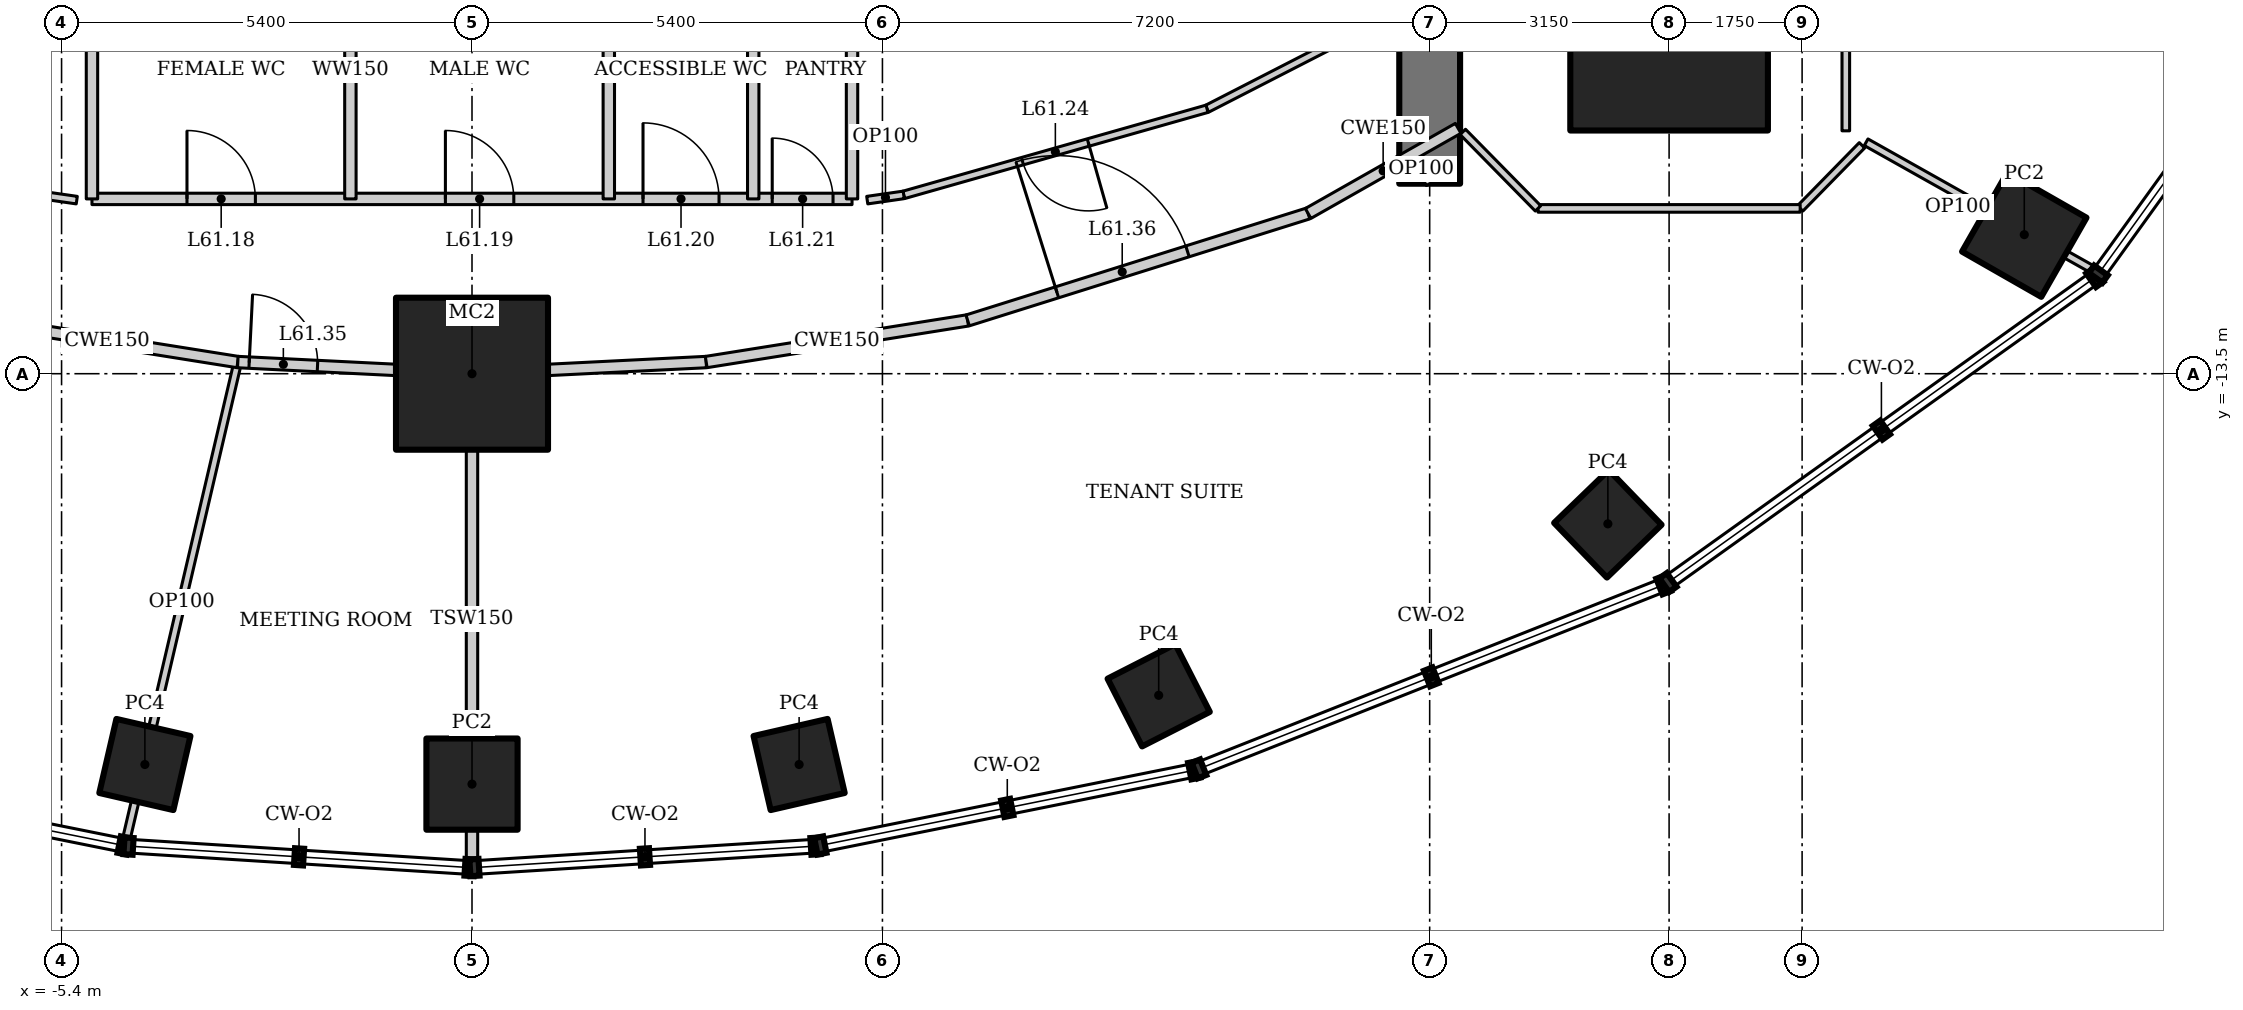
"""IFC4 building model, lengths in metres.
Left out: names, types, materials, properties, quantities, classifications, styles, units other than length and angle.
Written with IfcOpenShell. Run it as: python <this file> out.ifc"""

import sys

from ifc_helpers import new_model, si_unit, direction, frame, frame_2d, origin, origin_2d, place, context, subcontext, project, spatial, rectangle, hollow_rectangle, extrude, element, fill, save


model = new_model("IFC4")
c1 = context("Model", 3, precision=1e-05, world=origin(), true_north=direction((0.0, 1.0)))
c2 = subcontext(c1, "Body", "Model", "MODEL_VIEW")
j1 = project(units=[si_unit("LENGTHUNIT", "METRE"), si_unit("PLANEANGLEUNIT", "RADIAN")], contexts=[c1])
p1 = place(None, origin())
s1 = spatial("IfcSite", under=j1, at=p1, CompositionType="ELEMENT")
p2 = place(p1, origin())
s2 = spatial("IfcBuilding", under=s1, at=p2, CompositionType="ELEMENT")
p3 = place(p2, frame((0.0, 0.0, 262.0)))
s3 = spatial("IfcBuildingStorey", under=s2, at=p3, CompositionType="ELEMENT", Elevation=262.0)
p4 = place(p3, frame((0.0, -13.5, 0.0), z_axis=(0.0, 0.0, 1.0), x_axis=(1.0, 0.0, 0.0)))
e1 = element("IfcColumn", 1, at=p4, inside=s3, PredefinedType="COLUMN", context=c2, shape_type="SweptSolid", body=[
    extrude(hollow_rectangle(XDim=2.0, YDim=2.0, WallThickness=0.17, at=origin_2d()), origin(), (0.0, 0.0, 1.0), 4.2),
])
p5 = place(p3, frame((15.75, -9.0, 0.0), z_axis=(0.0, 0.0, 1.0), x_axis=(1.0, 0.0, 0.0)))
e2 = element("IfcColumn", 2, at=p5, inside=s3, PredefinedType="COLUMN", context=c2, shape_type="SweptSolid", body=[
    extrude(hollow_rectangle(XDim=2.6, YDim=2.6, WallThickness=0.13, at=origin_2d()), origin(), (0.0, 0.0, 1.0), 4.2),
])
p6 = place(p3, frame((-4.304, -18.642, 0.0), z_axis=(0.0, 0.0, 1.0), x_axis=(0.224951054344, 0.974370064785, 0.0)))
e3 = element("IfcColumn", 3, at=p6, inside=s3, PredefinedType="COLUMN", context=c2, shape_type="SweptSolid", body=[
    extrude(hollow_rectangle(XDim=1.0, YDim=1.0, WallThickness=0.08, at=origin_2d()), origin(), (0.0, 0.0, 1.0), 3.1),
])
p7 = place(p3, frame((0.0, -18.9, 0.0), z_axis=(0.0, 0.0, 1.0), x_axis=(1.0, 0.0, 0.0)))
e4 = element("IfcColumn", 4, at=p7, inside=s3, PredefinedType="COLUMN", context=c2, shape_type="SweptSolid", body=[
    extrude(hollow_rectangle(XDim=1.2, YDim=1.2, WallThickness=0.1, at=origin_2d()), origin(), (0.0, 0.0, 1.0), 2.88),
])
for number, where, z_axis, x_axis in (
    (5, (4.304, -18.642, 0.0), (0.0, 0.0, 1.0), (0.974, 0.225, 0.0)),
    (6, (9.035, -17.731, 0.0), (0.0, 0.0, 1.0), (0.891, 0.454, 0.0)),
    (7, (14.944, -15.475, 0.0), (0.0, 0.0, 1.0), (0.719, 0.695, 0.0)),
):
    element("IfcColumn", number, at=place(p3, frame(where, z_axis=z_axis, x_axis=x_axis)), inside=s3, PredefinedType="COLUMN", context=c2, shape_type="SweptSolid", body=[
        extrude(hollow_rectangle(XDim=1.0, YDim=1.0, WallThickness=0.08, at=origin_2d()), origin(), (0.0, 0.0, 1.0), 3.1),
    ])
p8 = place(p3, frame((20.423, -11.67, 0.0), z_axis=(0.0, 0.0, 1.0), x_axis=(0.496139221777, 0.86824298017, 0.0)))
e8 = element("IfcColumn", 8, at=p8, inside=s3, PredefinedType="COLUMN", context=c2, shape_type="SweptSolid", body=[
    extrude(hollow_rectangle(XDim=1.2, YDim=1.2, WallThickness=0.1, at=origin_2d()), origin(), (0.0, 0.0, 1.0), 2.88),
])
p9 = place(p3, frame((12.6, -11.0, 0.0), z_axis=(0.0, 0.0, 1.0), x_axis=(0.0, 1.0, 0.0)))
e9 = element("IfcWall", 9, at=p9, inside=s3, PredefinedType="SHEAR", context=c2, shape_type="SweptSolid", body=[
    extrude(rectangle(XDim=22.0, YDim=0.8, at=frame_2d((11.0, 0.0))), origin(), (0.0, 0.0, 1.0), 4.2),
])
p10 = place(p9, frame((10.1, 0.0, 0.0)))
e10 = element("IfcOpeningElement", 10, at=p10, cuts=e9, PredefinedType="OPENING", context=c2, shape_type="SweptSolid", body=[
    extrude(rectangle(XDim=1.8, YDim=2.1, at=frame_2d((0.9, 1.05))), frame((0.0, 0.41, 0.0), z_axis=(0.0, -1.0, 0.0), x_axis=(1.0, 0.0, 0.0)), (0.0, 0.0, 1.0), 0.82),
])
p11 = place(p3, frame((-4.556, -19.657, 0.0), z_axis=(0.0, 0.0, 1.0), x_axis=(0.227524978141, 0.973772244584, 0.0)))
e11 = element("IfcWall", 11, at=p11, inside=s3, PredefinedType="PARTITIONING", context=c2, shape_type="SweptSolid", body=[
    extrude(rectangle(XDim=6.48, YDim=0.1, at=frame_2d((3.24, 0.0))), origin(), (0.0, 0.0, 1.0), 3.293),
])
p12 = place(p3, frame((0.0, -19.945, 0.0), z_axis=(0.0, 0.0, 1.0), x_axis=(0.0, 1.0, 0.0)))
e12 = element("IfcWall", 12, at=p12, inside=s3, PredefinedType="PARTITIONING", context=c2, shape_type="SweptSolid", body=[
    extrude(rectangle(XDim=6.445, YDim=0.15, at=frame_2d((3.222, 0.0))), origin(), (0.0, 0.0, 1.0), 3.646),
])
p13 = place(p3, frame((-6.521, -12.799, 0.0), z_axis=(0.0, 0.0, 1.0), x_axis=(0.987554093087, -0.157279729233, 0.0)))
e13 = element("IfcWall", 13, at=p13, inside=s3, PredefinedType="PARTITIONING", context=c2, shape_type="SweptSolid", body=[
    extrude(rectangle(XDim=3.483, YDim=0.15, at=frame_2d((1.742, 0.0))), origin(), (0.0, 0.0, 1.0), 4.05),
])
p14 = place(p3, frame((-3.081, -13.347, 0.0), z_axis=(0.0, 0.0, 1.0), x_axis=(0.99876434787, -0.049696855278, 0.0)))
e14 = element("IfcWall", 14, at=p14, inside=s3, PredefinedType="PARTITIONING", context=c2, shape_type="SweptSolid", body=[
    extrude(rectangle(XDim=3.085, YDim=0.15, at=frame_2d((1.542, 0.0))), origin(), (0.0, 0.0, 1.0), 4.05),
])
p15 = place(p14, frame((0.15, 0.0, 0.0)))
e15 = element("IfcOpeningElement", 15, at=p15, cuts=e14, PredefinedType="OPENING", context=c2, shape_type="SweptSolid", body=[
    extrude(rectangle(XDim=0.9, YDim=2.1, at=frame_2d((0.45, 1.05))), frame((0.0, 0.085, 0.0), z_axis=(0.0, -1.0, 0.0), x_axis=(1.0, 0.0, 0.0)), (0.0, 0.0, 1.0), 0.17),
])
p16 = place(p3, frame((0.0, -13.5, 0.0), z_axis=(0.0, 0.0, 1.0), x_axis=(0.99876434787, 0.049696855278, 0.0)))
e16 = element("IfcWall", 16, at=p16, inside=s3, PredefinedType="PARTITIONING", context=c2, shape_type="SweptSolid", body=[
    extrude(rectangle(XDim=3.085, YDim=0.15, at=frame_2d((1.542, 0.0))), origin(), (0.0, 0.0, 1.0), 4.05),
])
p17 = place(p3, frame((3.081, -13.347, 0.0), z_axis=(0.0, 0.0, 1.0), x_axis=(0.987554093087, 0.157279729233, 0.0)))
e17 = element("IfcWall", 17, at=p17, inside=s3, PredefinedType="PARTITIONING", context=c2, shape_type="SweptSolid", body=[
    extrude(rectangle(XDim=3.483, YDim=0.15, at=frame_2d((1.742, 0.0))), origin(), (0.0, 0.0, 1.0), 4.05),
])
p18 = place(p3, frame((6.521, -12.799, 0.0), z_axis=(0.0, 0.0, 1.0), x_axis=(0.954031103669, 0.299707612903, 0.0)))
e18 = element("IfcWall", 18, at=p18, inside=s3, PredefinedType="PARTITIONING", context=c2, shape_type="SweptSolid", body=[
    extrude(rectangle(XDim=4.695, YDim=0.15, at=frame_2d((2.348, 0.0))), origin(), (0.0, 0.0, 1.0), 4.05),
])
p19 = place(p18, frame((1.231, 0.0, 0.0)))
e19 = element("IfcOpeningElement", 19, at=p19, cuts=e18, PredefinedType="OPENING", context=c2, shape_type="SweptSolid", body=[
    extrude(rectangle(XDim=1.8, YDim=2.1, at=frame_2d((0.9, 1.05))), frame((0.0, 0.085, 0.0), z_axis=(0.0, -1.0, 0.0), x_axis=(1.0, 0.0, 0.0)), (0.0, 0.0, 1.0), 0.17),
])
p20 = place(p3, frame((-5.0, -11.2, 0.0), z_axis=(0.0, 0.0, 1.0), x_axis=(1.0, 0.0, 0.0)))
e20 = element("IfcWall", 20, at=p20, inside=s3, PredefinedType="SOLIDWALL", context=c2, shape_type="SweptSolid", body=[
    extrude(rectangle(XDim=10.0, YDim=0.15, at=frame_2d((5.0, 0.0))), origin(), (0.0, 0.0, 1.0), 4.05),
])
p21 = place(p20, frame((1.25, 0.0, 0.0)))
e21 = element("IfcOpeningElement", 21, at=p21, cuts=e20, PredefinedType="OPENING", context=c2, shape_type="SweptSolid", body=[
    extrude(rectangle(XDim=0.9, YDim=2.1, at=frame_2d((0.45, 1.05))), frame((0.0, 0.085, 0.0), z_axis=(0.0, -1.0, 0.0), x_axis=(1.0, 0.0, 0.0)), (0.0, 0.0, 1.0), 0.17),
])
p22 = place(p20, frame((4.65, 0.0, 0.0)))
e22 = element("IfcOpeningElement", 22, at=p22, cuts=e20, PredefinedType="OPENING", context=c2, shape_type="SweptSolid", body=[
    extrude(rectangle(XDim=0.9, YDim=2.1, at=frame_2d((0.45, 1.05))), frame((0.0, 0.085, 0.0), z_axis=(0.0, -1.0, 0.0), x_axis=(1.0, 0.0, 0.0)), (0.0, 0.0, 1.0), 0.17),
])
p23 = place(p20, frame((7.25, 0.0, 0.0)))
e23 = element("IfcOpeningElement", 23, at=p23, cuts=e20, PredefinedType="OPENING", context=c2, shape_type="SweptSolid", body=[
    extrude(rectangle(XDim=1.0, YDim=2.1, at=frame_2d((0.5, 1.05))), frame((0.0, 0.085, 0.0), z_axis=(0.0, -1.0, 0.0), x_axis=(1.0, 0.0, 0.0)), (0.0, 0.0, 1.0), 0.17),
])
p24 = place(p20, frame((8.95, 0.0, 0.0)))
e24 = element("IfcOpeningElement", 24, at=p24, cuts=e20, PredefinedType="OPENING", context=c2, shape_type="SweptSolid", body=[
    extrude(rectangle(XDim=0.8, YDim=2.1, at=frame_2d((0.4, 1.05))), frame((0.0, 0.085, 0.0), z_axis=(0.0, -1.0, 0.0), x_axis=(1.0, 0.0, 0.0)), (0.0, 0.0, 1.0), 0.17),
])
for number, where, z_axis, x_axis in (
    (25, (-5.0, -7.8, 0.0), (0.0, 0.0, 1.0), (0.0, -1.0, 0.0)),
    (26, (5.0, -7.8, 0.0), (0.0, 0.0, 1.0), (0.0, -1.0, 0.0)),
    (27, (-1.6, -7.8, 0.0), (0.0, 0.0, 1.0), (0.0, -1.0, 0.0)),
):
    element("IfcWall", number, at=place(p3, frame(where, z_axis=z_axis, x_axis=x_axis)), inside=s3, PredefinedType="SOLIDWALL", context=c2, shape_type="SweptSolid", body=[
        extrude(rectangle(XDim=3.4, YDim=0.15, at=frame_2d((1.7, 0.0))), origin(), (0.0, 0.0, 1.0), 4.05),
    ])
p25 = place(p3, frame((1.8, -7.8, 0.0), z_axis=(0.0, 0.0, 1.0), x_axis=(0.0, -1.0, 0.0)))
e28 = element("IfcWall", 28, at=p25, inside=s3, PredefinedType="SOLIDWALL", context=c2, shape_type="SweptSolid", body=[
    extrude(rectangle(XDim=3.4, YDim=0.15, at=frame_2d((1.7, 0.0))), origin(), (0.0, 0.0, 1.0), 3.293),
])
p26 = place(p3, frame((3.7, -7.8, 0.0), z_axis=(0.0, 0.0, 1.0), x_axis=(0.0, -1.0, 0.0)))
e29 = element("IfcWall", 29, at=p26, inside=s3, PredefinedType="SOLIDWALL", context=c2, shape_type="SweptSolid", body=[
    extrude(rectangle(XDim=3.4, YDim=0.15, at=frame_2d((1.7, 0.0))), origin(), (0.0, 0.0, 1.0), 4.05),
])
p27 = place(p3, frame((-5.2, -11.216, 0.0), z_axis=(0.0, 0.0, 1.0), x_axis=(-0.989797891768, 0.142478536811, 0.0)))
e30 = element("IfcWall", 30, at=p27, inside=s3, PredefinedType="PARTITIONING", context=c2, shape_type="SweptSolid", body=[
    extrude(rectangle(XDim=0.485, YDim=0.1, at=frame_2d((0.242, 0.0))), origin(), (0.0, 0.0, 1.0), 4.05),
])
p28 = place(p3, frame((11.71, -8.967, 0.0), z_axis=(0.0, 0.0, 1.0), x_axis=(-0.889605609385, -0.456729525814, 0.0)))
e31 = element("IfcWall", 31, at=p28, inside=s3, PredefinedType="PARTITIONING", context=c2, shape_type="SweptSolid", body=[
    extrude(rectangle(XDim=2.293, YDim=0.1, at=frame_2d((1.146, 0.0))), origin(), (0.0, 0.0, 1.0), 4.05),
])
p29 = place(p3, frame((9.67, -10.014, 0.0), z_axis=(0.0, 0.0, 1.0), x_axis=(-0.961973498971, -0.273142796496, 0.0)))
e32 = element("IfcWall", 32, at=p29, inside=s3, PredefinedType="PARTITIONING", context=c2, shape_type="SweptSolid", body=[
    extrude(rectangle(XDim=4.148, YDim=0.1, at=frame_2d((2.074, 0.0))), origin(), (0.0, 0.0, 1.0), 4.05),
])
p30 = place(p29, frame((1.624, 0.0, 0.0)))
e33 = element("IfcOpeningElement", 33, at=p30, cuts=e32, PredefinedType="OPENING", context=c2, shape_type="SweptSolid", body=[
    extrude(rectangle(XDim=0.9, YDim=2.1, at=frame_2d((0.45, 1.05))), frame((0.0, 0.06, 0.0), z_axis=(0.0, -1.0, 0.0), x_axis=(1.0, 0.0, 0.0)), (0.0, 0.0, 1.0), 0.12),
])
p31 = place(p3, frame((5.68, -11.147, 0.0), z_axis=(0.0, 0.0, 1.0), x_axis=(-0.989797891768, -0.142478536811, 0.0)))
e34 = element("IfcWall", 34, at=p31, inside=s3, PredefinedType="PARTITIONING", context=c2, shape_type="SweptSolid", body=[
    extrude(rectangle(XDim=0.485, YDim=0.1, at=frame_2d((0.242, 0.0))), origin(), (0.0, 0.0, 1.0), 4.05),
])
p32 = place(p3, frame((12.6, -11.0, 0.0), z_axis=(0.0, 0.0, 1.0), x_axis=(-0.493794495037, 0.869578631678, 0.0)))
e35 = element("IfcWall", 35, at=p32, inside=s3, PredefinedType="PARTITIONING", context=c2, shape_type="SweptSolid", body=[
    extrude(rectangle(XDim=0.449, YDim=0.1, at=frame_2d((0.225, 0.0))), origin(), (0.0, 0.0, 1.0), 4.05),
])
p33 = place(p3, frame((21.358, -12.15, 0.0), z_axis=(0.0, 0.0, 1.0), x_axis=(-0.871730019583, 0.489986502832, 0.0)))
e36 = element("IfcWall", 36, at=p33, inside=s3, PredefinedType="PARTITIONING", context=c2, shape_type="SweptSolid", body=[
    extrude(rectangle(XDim=3.46, YDim=0.1, at=frame_2d((1.73, 0.0))), origin(), (0.0, 0.0, 1.0), 3.522),
])
p34 = place(p3, frame((11.001, -11.392, 0.0), z_axis=(0.0, 0.0, 1.0), x_axis=(0.869722107117, 0.493541747366, 0.0)))
e37 = element("IfcWall", 37, at=p34, inside=s3, PredefinedType="PARTITIONING", context=c2, shape_type="SweptSolid", body=[
    extrude(rectangle(XDim=2.27, YDim=0.15, at=frame_2d((1.135, 0.0))), origin(), (0.0, 0.0, 1.0), 4.05),
])
p35 = place(p3, frame((18.288, -10.495, 0.0), z_axis=(0.0, 0.0, 1.0), x_axis=(-0.699823580681, -0.714315725659, 0.0)))
e38 = element("IfcWall", 38, at=p35, inside=s3, PredefinedType="PARTITIONING", context=c2, shape_type="SweptSolid", body=[
    extrude(rectangle(XDim=1.162, YDim=0.1, at=frame_2d((0.581, 0.0))), origin(), (0.0, 0.0, 1.0), 4.05),
])
p36 = place(p3, frame((17.475, -11.325, 0.0), z_axis=(0.0, 0.0, 1.0), x_axis=(-1.0, 0.0, 0.0)))
e39 = element("IfcWall", 39, at=p36, inside=s3, PredefinedType="PARTITIONING", context=c2, shape_type="SweptSolid", body=[
    extrude(rectangle(XDim=3.449, YDim=0.1, at=frame_2d((1.725, 0.0))), origin(), (0.0, 0.0, 1.0), 4.05),
])
p37 = place(p3, frame((14.025, -11.325, 0.0), z_axis=(0.0, 0.0, 1.0), x_axis=(-0.701113567316, 0.713049623606, 0.0)))
e40 = element("IfcWall", 40, at=p37, inside=s3, PredefinedType="PARTITIONING", context=c2, shape_type="SweptSolid", body=[
    extrude(rectangle(XDim=1.411, YDim=0.1, at=frame_2d((0.706, 0.0))), origin(), (0.0, 0.0, 1.0), 4.05),
])
p38 = place(p3, frame((18.075, -7.275, 0.0), z_axis=(0.0, 0.0, 1.0), x_axis=(0.0, -1.0, 0.0)))
e41 = element("IfcWall", 41, at=p38, inside=s3, PredefinedType="PARTITIONING", context=c2, shape_type="SweptSolid", body=[
    extrude(rectangle(XDim=3.029, YDim=0.1, at=frame_2d((1.514, 0.0))), origin(), (0.0, 0.0, 1.0), 3.6),
])
p39 = place(p21, origin())
e42 = element("IfcDoor", 42, at=p39, inside=s3, OperationType="SINGLE_SWING_LEFT", PredefinedType="DOOR", context=c2, shape_type="SweptSolid", body=[
    extrude(rectangle(XDim=0.9, YDim=2.1, at=frame_2d((0.45, 1.05))), frame((0.0, 0.025, 0.0), z_axis=(0.0, -1.0, 0.0), x_axis=(1.0, 0.0, 0.0)), (0.0, 0.0, 1.0), 0.05),
])
fill(e21, e42)
p40 = place(p22, origin())
e43 = element("IfcDoor", 43, at=p40, inside=s3, OperationType="SINGLE_SWING_LEFT", PredefinedType="DOOR", context=c2, shape_type="SweptSolid", body=[
    extrude(rectangle(XDim=0.9, YDim=2.1, at=frame_2d((0.45, 1.05))), frame((0.0, 0.025, 0.0), z_axis=(0.0, -1.0, 0.0), x_axis=(1.0, 0.0, 0.0)), (0.0, 0.0, 1.0), 0.05),
])
fill(e22, e43)
p41 = place(p23, origin())
e44 = element("IfcDoor", 44, at=p41, inside=s3, OperationType="SINGLE_SWING_LEFT", PredefinedType="DOOR", context=c2, shape_type="SweptSolid", body=[
    extrude(rectangle(XDim=1.0, YDim=2.1, at=frame_2d((0.5, 1.05))), frame((0.0, 0.025, 0.0), z_axis=(0.0, -1.0, 0.0), x_axis=(1.0, 0.0, 0.0)), (0.0, 0.0, 1.0), 0.05),
])
fill(e23, e44)
p42 = place(p24, origin())
e45 = element("IfcDoor", 45, at=p42, inside=s3, OperationType="SINGLE_SWING_LEFT", PredefinedType="DOOR", context=c2, shape_type="SweptSolid", body=[
    extrude(rectangle(XDim=0.8, YDim=2.1, at=frame_2d((0.4, 1.05))), frame((0.0, 0.025, 0.0), z_axis=(0.0, -1.0, 0.0), x_axis=(1.0, 0.0, 0.0)), (0.0, 0.0, 1.0), 0.05),
])
fill(e24, e45)
p43 = place(p30, origin())
e46 = element("IfcDoor", 46, at=p43, inside=s3, OperationType="SINGLE_SWING_LEFT", PredefinedType="DOOR", context=c2, shape_type="SweptSolid", body=[
    extrude(rectangle(XDim=0.9, YDim=2.1, at=frame_2d((0.45, 1.05))), frame((0.0, 0.025, 0.0), z_axis=(0.0, -1.0, 0.0), x_axis=(1.0, 0.0, 0.0)), (0.0, 0.0, 1.0), 0.05),
])
fill(e33, e46)
p44 = place(p15, origin())
e47 = element("IfcDoor", 47, at=p44, inside=s3, OperationType="SINGLE_SWING_LEFT", PredefinedType="DOOR", context=c2, shape_type="SweptSolid", body=[
    extrude(rectangle(XDim=0.9, YDim=2.1, at=frame_2d((0.45, 1.05))), frame((0.0, 0.025, 0.0), z_axis=(0.0, -1.0, 0.0), x_axis=(1.0, 0.0, 0.0)), (0.0, 0.0, 1.0), 0.05),
])
fill(e15, e47)
p45 = place(p19, origin())
e48 = element("IfcDoor", 48, at=p45, inside=s3, OperationType="DOUBLE_DOOR_DOUBLE_SWING", PredefinedType="DOOR", context=c2, shape_type="SweptSolid", body=[
    extrude(rectangle(XDim=1.8, YDim=2.1, at=frame_2d((0.9, 1.05))), frame((0.0, 0.025, 0.0), z_axis=(0.0, -1.0, 0.0), x_axis=(1.0, 0.0, 0.0)), (0.0, 0.0, 1.0), 0.05),
])
fill(e19, e48)
save(model, sys.argv[1])
